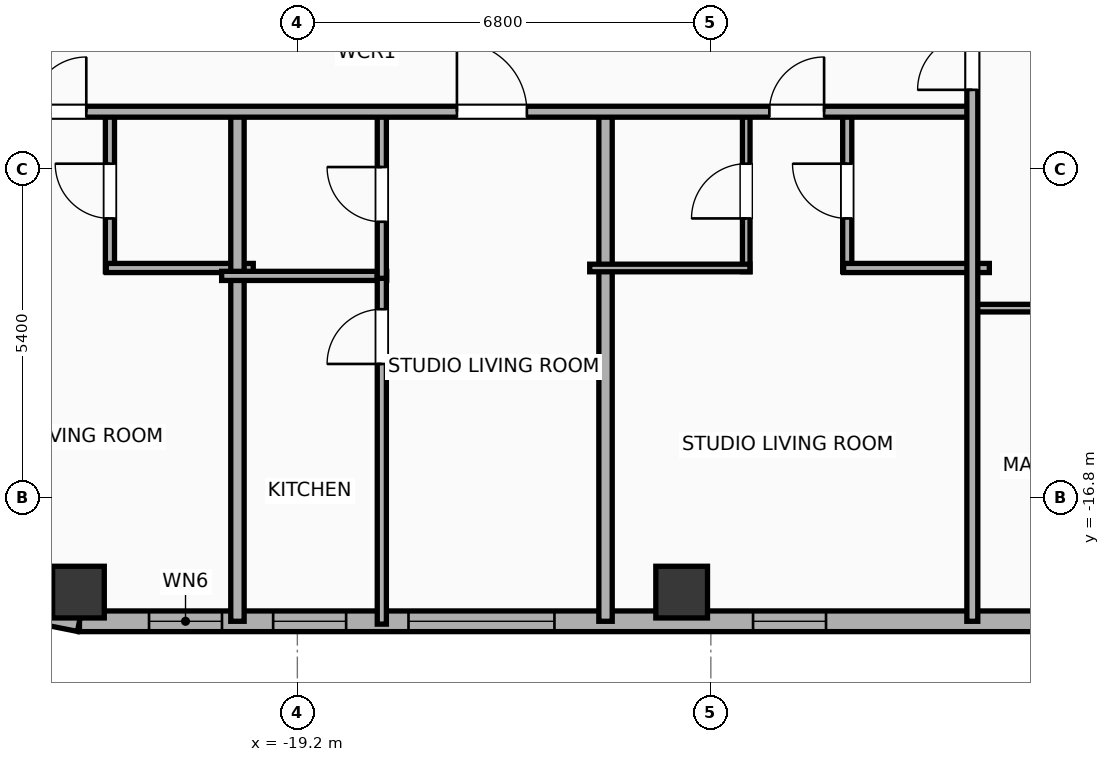
"""IFC4 building model, lengths in metres.
Left out: names, types, materials, properties, quantities, classifications, styles, units other than length and angle.
Written with IfcOpenShell. Run it as: python <this file> out.ifc"""

import sys

from ifc_helpers import new_model, si_unit, direction, frame, frame_2d, origin, origin_2d, place, context, subcontext, project, spatial, rectangle, hollow_rectangle, extrude, element, fill, save


model = new_model("IFC4")
c1 = context("Model", 3, precision=1e-05, world=origin(), true_north=direction((0.0, 1.0)))
c2 = subcontext(c1, "Body", "Model", "MODEL_VIEW")
j1 = project(units=[si_unit("LENGTHUNIT", "METRE"), si_unit("PLANEANGLEUNIT", "RADIAN")], contexts=[c1])
p1 = place(None, origin())
s1 = spatial("IfcSite", under=j1, at=p1, CompositionType="ELEMENT")
p2 = place(p1, origin())
s2 = spatial("IfcBuilding", under=s1, at=p2, CompositionType="ELEMENT")
p3 = place(p2, frame((0.0, 0.0, 227.5)))
s3 = spatial("IfcBuildingStorey", under=s2, at=p3, CompositionType="ELEMENT", Elevation=227.5)
for number, where, z_axis, x_axis in (
    (1, (-22.8, -18.35, 0.0), (0.0, 0.0, 1.0), (1.0, 0.0, 0.0)),
    (2, (-12.88, -18.35, 0.0), (0.0, 0.0, 1.0), (1.0, 0.0, 0.0)),
):
    element("IfcColumn", number, at=place(p3, frame(where, z_axis=z_axis, x_axis=x_axis)), inside=s3, PredefinedType="COLUMN", context=c2, shape_type="SweptSolid", body=[
        extrude(hollow_rectangle(XDim=0.85, YDim=0.85, WallThickness=0.028, at=origin_2d()), origin(), (0.0, 0.0, 1.0), 3.9),
    ])
p4 = place(p3, frame((26.783, -18.83, 0.0), z_axis=(0.0, 0.0, 1.0), x_axis=(-1.0, 0.0, 0.0)))
e3 = element("IfcWall", 3, at=p4, inside=s3, PredefinedType="ELEMENTEDWALL", context=c2, shape_type="SweptSolid", body=[
    extrude(rectangle(XDim=49.566, YDim=0.34, at=frame_2d((24.783, 0.0))), origin(), (0.0, 0.0, 1.0), 3.65),
])
p5 = place(p4, frame((23.583, 0.0, 0.75)))
e4 = element("IfcOpeningElement", 4, at=p5, cuts=e3, PredefinedType="OPENING", context=c2, shape_type="SweptSolid", body=[
    extrude(rectangle(XDim=2.4, YDim=2.1, at=frame_2d((1.2, 1.05))), frame((0.0, 0.18, 0.0), z_axis=(0.0, -1.0, 0.0), x_axis=(1.0, 0.0, 0.0)), (0.0, 0.0, 1.0), 0.36),
])
p6 = place(p4, frame((41.756, 0.0, 0.75)))
e5 = element("IfcOpeningElement", 5, at=p6, cuts=e3, PredefinedType="OPENING", context=c2, shape_type="SweptSolid", body=[
    extrude(rectangle(XDim=2.4, YDim=2.1, at=frame_2d((1.2, 1.05))), frame((0.0, 0.18, 0.0), z_axis=(0.0, -1.0, 0.0), x_axis=(1.0, 0.0, 0.0)), (0.0, 0.0, 1.0), 0.36),
])
p7 = place(p4, frame((47.222, 0.0, 0.75)))
e6 = element("IfcOpeningElement", 6, at=p7, cuts=e3, PredefinedType="OPENING", context=c2, shape_type="SweptSolid", body=[
    extrude(rectangle(XDim=1.2, YDim=2.05, at=frame_2d((0.6, 1.025))), frame((0.0, 0.18, 0.0), z_axis=(0.0, -1.0, 0.0), x_axis=(1.0, 0.0, 0.0)), (0.0, 0.0, 1.0), 0.36),
])
p8 = place(p4, frame((45.181, 0.0, 0.75)))
e7 = element("IfcOpeningElement", 7, at=p8, cuts=e3, PredefinedType="OPENING", context=c2, shape_type="SweptSolid", body=[
    extrude(rectangle(XDim=1.2, YDim=2.05, at=frame_2d((0.6, 1.025))), frame((0.0, 0.18, 0.0), z_axis=(0.0, -1.0, 0.0), x_axis=(1.0, 0.0, 0.0)), (0.0, 0.0, 1.0), 0.36),
])
p9 = place(p4, frame((37.289, 0.0, 0.75)))
e8 = element("IfcOpeningElement", 8, at=p9, cuts=e3, PredefinedType="OPENING", context=c2, shape_type="SweptSolid", body=[
    extrude(rectangle(XDim=1.2, YDim=2.05, at=frame_2d((0.6, 1.025))), frame((0.0, 0.18, 0.0), z_axis=(0.0, -1.0, 0.0), x_axis=(1.0, 0.0, 0.0)), (0.0, 0.0, 1.0), 0.36),
])
p10 = place(p4, frame((16.115, 0.0, 0.75)))
e9 = element("IfcOpeningElement", 9, at=p10, cuts=e3, PredefinedType="OPENING", context=c2, shape_type="SweptSolid", body=[
    extrude(rectangle(XDim=1.2, YDim=2.05, at=frame_2d((0.6, 1.025))), frame((0.0, 0.18, 0.0), z_axis=(0.0, -1.0, 0.0), x_axis=(1.0, 0.0, 0.0)), (0.0, 0.0, 1.0), 0.36),
])
p11 = place(p4, frame((12.422, 0.0, 0.75)))
e10 = element("IfcOpeningElement", 10, at=p11, cuts=e3, PredefinedType="OPENING", context=c2, shape_type="SweptSolid", body=[
    extrude(rectangle(XDim=1.2, YDim=2.05, at=frame_2d((0.6, 1.025))), frame((0.0, 0.18, 0.0), z_axis=(0.0, -1.0, 0.0), x_axis=(1.0, 0.0, 0.0)), (0.0, 0.0, 1.0), 0.36),
])
p12 = place(p4, frame((8.09, 0.0, 0.75)))
e11 = element("IfcOpeningElement", 11, at=p12, cuts=e3, PredefinedType="OPENING", context=c2, shape_type="SweptSolid", body=[
    extrude(rectangle(XDim=1.2, YDim=2.05, at=frame_2d((0.6, 1.025))), frame((0.0, 0.18, 0.0), z_axis=(0.0, -1.0, 0.0), x_axis=(1.0, 0.0, 0.0)), (0.0, 0.0, 1.0), 0.36),
])
p13 = place(p4, frame((4.637, 0.0, 0.75)))
e12 = element("IfcOpeningElement", 12, at=p13, cuts=e3, PredefinedType="OPENING", context=c2, shape_type="SweptSolid", body=[
    extrude(rectangle(XDim=1.2, YDim=2.05, at=frame_2d((0.6, 1.025))), frame((0.0, 0.18, 0.0), z_axis=(0.0, -1.0, 0.0), x_axis=(1.0, 0.0, 0.0)), (0.0, 0.0, 1.0), 0.36),
])
p14 = place(p4, frame((1.811, 0.0, 0.75)))
e13 = element("IfcOpeningElement", 13, at=p14, cuts=e3, PredefinedType="OPENING", context=c2, shape_type="SweptSolid", body=[
    extrude(rectangle(XDim=1.2, YDim=2.05, at=frame_2d((0.6, 1.025))), frame((0.0, 0.18, 0.0), z_axis=(0.0, -1.0, 0.0), x_axis=(1.0, 0.0, 0.0)), (0.0, 0.0, 1.0), 0.36),
])
p15 = place(p4, frame((32.253, 0.0, 0.75)))
e14 = element("IfcOpeningElement", 14, at=p15, cuts=e3, PredefinedType="OPENING", context=c2, shape_type="SweptSolid", body=[
    extrude(rectangle(XDim=1.2, YDim=2.05, at=frame_2d((0.6, 1.025))), frame((0.0, 0.18, 0.0), z_axis=(0.0, -1.0, 0.0), x_axis=(1.0, 0.0, 0.0)), (0.0, 0.0, 1.0), 0.36),
])
p16 = place(p4, frame((27.853, 0.0, 0.75)))
e15 = element("IfcOpeningElement", 15, at=p16, cuts=e3, PredefinedType="OPENING", context=c2, shape_type="SweptSolid", body=[
    extrude(rectangle(XDim=1.2, YDim=2.05, at=frame_2d((0.6, 1.025))), frame((0.0, 0.18, 0.0), z_axis=(0.0, -1.0, 0.0), x_axis=(1.0, 0.0, 0.0)), (0.0, 0.0, 1.0), 0.36),
])
p17 = place(p4, frame((20.473, 0.0, 0.75)))
e16 = element("IfcOpeningElement", 16, at=p17, cuts=e3, PredefinedType="OPENING", context=c2, shape_type="SweptSolid", body=[
    extrude(rectangle(XDim=1.2, YDim=2.05, at=frame_2d((0.6, 1.025))), frame((0.0, 0.18, 0.0), z_axis=(0.0, -1.0, 0.0), x_axis=(1.0, 0.0, 0.0)), (0.0, 0.0, 1.0), 0.36),
])
p18 = place(p3, frame((-22.783, -18.83, 0.0), z_axis=(0.0, 0.0, 1.0), x_axis=(-0.980788153188, 0.195075878998, 0.0)))
e17 = element("IfcWall", 17, at=p18, inside=s3, PredefinedType="ELEMENTEDWALL", context=c2, shape_type="SweptSolid", body=[
    extrude(rectangle(XDim=1.354, YDim=0.34, at=frame_2d((0.677, 0.0))), origin(), (0.0, 0.0, 1.0), 3.65),
])
p19 = place(p3, frame((-22.282, -13.08, 0.0), z_axis=(0.0, 0.0, 1.0), x_axis=(0.0, 1.0, 0.0)))
e18 = element("IfcWall", 18, at=p19, inside=s3, PredefinedType="PLUMBINGWALL", context=c2, shape_type="SweptSolid", body=[
    extrude(rectangle(XDim=2.65, YDim=0.15, at=frame_2d((1.325, 0.0))), origin(), (0.0, 0.0, 1.0), 3.65),
])
p20 = place(p19, frame((0.875, 0.0, 0.0)))
e19 = element("IfcOpeningElement", 19, at=p20, cuts=e18, PredefinedType="OPENING", context=c2, shape_type="SweptSolid", body=[
    extrude(rectangle(XDim=0.9, YDim=2.05, at=frame_2d((0.45, 1.025))), frame((0.0, 0.085, 0.0), z_axis=(0.0, -1.0, 0.0), x_axis=(1.0, 0.0, 0.0)), (0.0, 0.0, 1.0), 0.17),
])
p21 = place(p3, frame((-22.342, -13.02, 0.0), z_axis=(0.0, 0.0, 1.0), x_axis=(1.0, 0.0, 0.0)))
e20 = element("IfcWall", 20, at=p21, inside=s3, PredefinedType="PLUMBINGWALL", context=c2, shape_type="SweptSolid", body=[
    extrude(rectangle(XDim=2.417, YDim=0.15, at=frame_2d((1.208, 0.0))), origin(), (0.0, 0.0, 1.0), 3.65),
])
p22 = place(p3, frame((-20.185, -18.83, 0.0), z_axis=(0.0, 0.0, 1.0), x_axis=(0.0, 1.0, 0.0)))
e21 = element("IfcWall", 21, at=p22, inside=s3, PredefinedType="PARTITIONING", context=c2, shape_type="SweptSolid", body=[
    extrude(rectangle(XDim=8.46, YDim=0.22, at=frame_2d((4.23, 0.0))), origin(), (0.0, 0.0, 1.0), 3.09),
])
p23 = place(p3, frame((-20.445, -13.15, 0.0), z_axis=(0.0, 0.0, 1.0), x_axis=(1.0, 0.0, 0.0)))
e22 = element("IfcWall", 22, at=p23, inside=s3, PredefinedType="PLUMBINGWALL", context=c2, shape_type="SweptSolid", body=[
    extrude(rectangle(XDim=2.714, YDim=0.15, at=frame_2d((1.357, 0.0))), origin(), (0.0, 0.0, 1.0), 3.65),
])
p24 = place(p3, frame((-17.811, -18.877, 0.0), z_axis=(0.0, 0.0, 1.0), x_axis=(0.0, 1.0, 0.0)))
e23 = element("IfcWall", 23, at=p24, inside=s3, PredefinedType="PLUMBINGWALL", context=c2, shape_type="SweptSolid", body=[
    extrude(rectangle(XDim=5.767, YDim=0.15, at=frame_2d((2.883, 0.0))), origin(), (0.0, 0.0, 1.0), 3.65),
])
p25 = place(p24, frame((4.279, 0.0, 0.0)))
e24 = element("IfcOpeningElement", 24, at=p25, cuts=e23, PredefinedType="OPENING", context=c2, shape_type="SweptSolid", body=[
    extrude(rectangle(XDim=0.9, YDim=2.05, at=frame_2d((0.45, 1.025))), frame((0.0, 0.085, 0.0), z_axis=(0.0, -1.0, 0.0), x_axis=(1.0, 0.0, 0.0)), (0.0, 0.0, 1.0), 0.17),
])
p26 = place(p3, frame((-17.811, -13.19, 0.0), z_axis=(0.0, 0.0, 1.0), x_axis=(0.0, 1.0, 0.0)))
e25 = element("IfcWall", 25, at=p26, inside=s3, PredefinedType="PLUMBINGWALL", context=c2, shape_type="SweptSolid", body=[
    extrude(rectangle(XDim=2.76, YDim=0.15, at=frame_2d((1.38, 0.0))), origin(), (0.0, 0.0, 1.0), 3.65),
])
p27 = place(p26, frame((0.93, 0.0, 0.0)))
e26 = element("IfcOpeningElement", 26, at=p27, cuts=e25, PredefinedType="OPENING", context=c2, shape_type="SweptSolid", body=[
    extrude(rectangle(XDim=0.9, YDim=2.05, at=frame_2d((0.45, 1.025))), frame((0.0, 0.085, 0.0), z_axis=(0.0, -1.0, 0.0), x_axis=(1.0, 0.0, 0.0)), (0.0, 0.0, 1.0), 0.17),
])
p28 = place(p3, frame((-14.132, -18.83, 0.0), z_axis=(0.0, 0.0, 1.0), x_axis=(0.0, 1.0, 0.0)))
e27 = element("IfcWall", 27, at=p28, inside=s3, PredefinedType="PARTITIONING", context=c2, shape_type="SweptSolid", body=[
    extrude(rectangle(XDim=8.46, YDim=0.22, at=frame_2d((4.23, 0.0))), origin(), (0.0, 0.0, 1.0), 3.65),
])
p29 = place(p3, frame((-11.818, -13.08, 0.0), z_axis=(0.0, 0.0, 1.0), x_axis=(0.0, 1.0, 0.0)))
e28 = element("IfcWall", 28, at=p29, inside=s3, PredefinedType="PARTITIONING", context=c2, shape_type="SweptSolid", body=[
    extrude(rectangle(XDim=2.65, YDim=0.125, at=frame_2d((1.325, 0.0))), origin(), (0.0, 0.0, 1.0), 3.65),
])
p30 = place(p29, frame((0.875, 0.0, 0.0)))
e29 = element("IfcOpeningElement", 29, at=p30, cuts=e28, PredefinedType="OPENING", context=c2, shape_type="SweptSolid", body=[
    extrude(rectangle(XDim=0.9, YDim=2.05, at=frame_2d((0.45, 1.025))), frame((0.0, 0.073, 0.0), z_axis=(0.0, -1.0, 0.0), x_axis=(1.0, 0.0, 0.0)), (0.0, 0.0, 1.0), 0.145),
])
p31 = place(p3, frame((-10.157, -13.08, 0.0), z_axis=(0.0, 0.0, 1.0), x_axis=(0.0, 1.0, 0.0)))
e30 = element("IfcWall", 30, at=p31, inside=s3, PredefinedType="PLUMBINGWALL", context=c2, shape_type="SweptSolid", body=[
    extrude(rectangle(XDim=2.65, YDim=0.15, at=frame_2d((1.325, 0.0))), origin(), (0.0, 0.0, 1.0), 3.65),
])
p32 = place(p31, frame((0.875, 0.0, 0.0)))
e31 = element("IfcOpeningElement", 31, at=p32, cuts=e30, PredefinedType="OPENING", context=c2, shape_type="SweptSolid", body=[
    extrude(rectangle(XDim=0.9, YDim=2.05, at=frame_2d((0.45, 1.025))), frame((0.0, 0.085, 0.0), z_axis=(0.0, -1.0, 0.0), x_axis=(1.0, 0.0, 0.0)), (0.0, 0.0, 1.0), 0.17),
])
p33 = place(p3, frame((-14.392, -13.02, 0.0), z_axis=(0.0, 0.0, 1.0), x_axis=(1.0, 0.0, 0.0)))
e32 = element("IfcWall", 32, at=p33, inside=s3, PredefinedType="PARTITIONING", context=c2, shape_type="SweptSolid", body=[
    extrude(rectangle(XDim=2.634, YDim=0.125, at=frame_2d((1.317, 0.0))), origin(), (0.0, 0.0, 1.0), 3.65),
])
p34 = place(p3, frame((-10.217, -13.02, 0.0), z_axis=(0.0, 0.0, 1.0), x_axis=(1.0, 0.0, 0.0)))
e33 = element("IfcWall", 33, at=p34, inside=s3, PredefinedType="PLUMBINGWALL", context=c2, shape_type="SweptSolid", body=[
    extrude(rectangle(XDim=2.397, YDim=0.15, at=frame_2d((1.198, 0.0))), origin(), (0.0, 0.0, 1.0), 3.65),
])
p35 = place(p3, frame((-26.23, -10.45, 0.0), z_axis=(0.0, 0.0, 1.0), x_axis=(1.0, 0.0, 0.0)))
e34 = element("IfcWall", 34, at=p35, inside=s3, PredefinedType="PARTITIONING", context=c2, shape_type="SweptSolid", body=[
    extrude(rectangle(XDim=18.15, YDim=0.18, at=frame_2d((9.075, 0.0))), origin(), (0.0, 0.0, 1.0), 3.65),
])
p36 = place(p35, frame((2.659, 0.0, 0.0)))
e35 = element("IfcOpeningElement", 35, at=p36, cuts=e34, PredefinedType="OPENING", context=c2, shape_type="SweptSolid", body=[
    extrude(rectangle(XDim=0.9, YDim=2.05, at=frame_2d((0.45, 1.025))), frame((0.0, 0.1, 0.0), z_axis=(0.0, -1.0, 0.0), x_axis=(1.0, 0.0, 0.0)), (0.0, 0.0, 1.0), 0.2),
])
p37 = place(p35, frame((9.654, 0.0, 0.0)))
e36 = element("IfcOpeningElement", 36, at=p37, cuts=e34, PredefinedType="OPENING", context=c2, shape_type="SweptSolid", body=[
    extrude(rectangle(XDim=1.15, YDim=2.05, at=frame_2d((0.575, 1.025))), frame((0.0, 0.1, 0.0), z_axis=(0.0, -1.0, 0.0), x_axis=(1.0, 0.0, 0.0)), (0.0, 0.0, 1.0), 0.2),
])
p38 = place(p35, frame((14.792, 0.0, 0.0)))
e37 = element("IfcOpeningElement", 37, at=p38, cuts=e34, PredefinedType="OPENING", context=c2, shape_type="SweptSolid", body=[
    extrude(rectangle(XDim=0.9, YDim=2.05, at=frame_2d((0.45, 1.025))), frame((0.0, 0.1, 0.0), z_axis=(0.0, -1.0, 0.0), x_axis=(1.0, 0.0, 0.0)), (0.0, 0.0, 1.0), 0.2),
])
p39 = place(p3, frame((-8.08, -13.68, 0.0), z_axis=(0.0, 0.0, 1.0), x_axis=(1.0, 0.0, 0.0)))
e38 = element("IfcWall", 38, at=p39, inside=s3, PredefinedType="PARTITIONING", context=c2, shape_type="SweptSolid", body=[
    extrude(rectangle(XDim=8.06, YDim=0.125, at=frame_2d((4.03, 0.0))), origin(), (0.0, 0.0, 1.0), 3.65),
])
p40 = place(p39, frame((1.323, 0.0, 0.0)))
e39 = element("IfcOpeningElement", 39, at=p40, cuts=e38, PredefinedType="OPENING", context=c2, shape_type="SweptSolid", body=[
    extrude(rectangle(XDim=0.9, YDim=2.05, at=frame_2d((0.45, 1.025))), frame((0.0, 0.073, 0.0), z_axis=(0.0, -1.0, 0.0), x_axis=(1.0, 0.0, 0.0)), (0.0, 0.0, 1.0), 0.145),
])
p41 = place(p39, frame((4.547, 0.0, 0.0)))
e40 = element("IfcOpeningElement", 40, at=p41, cuts=e38, PredefinedType="OPENING", context=c2, shape_type="SweptSolid", body=[
    extrude(rectangle(XDim=0.9, YDim=2.05, at=frame_2d((0.45, 1.025))), frame((0.0, 0.073, 0.0), z_axis=(0.0, -1.0, 0.0), x_axis=(1.0, 0.0, 0.0)), (0.0, 0.0, 1.0), 0.145),
])
p42 = place(p3, frame((-8.1, -18.83, 0.0), z_axis=(0.0, 0.0, 1.0), x_axis=(0.0, 1.0, 0.0)))
e41 = element("IfcWall", 41, at=p42, inside=s3, PredefinedType="PARTITIONING", context=c2, shape_type="SweptSolid", body=[
    extrude(rectangle(XDim=9.99, YDim=0.18, at=frame_2d((4.995, 0.0))), origin(), (0.0, 0.0, 1.0), 3.65),
])
p43 = place(p42, frame((8.74, 0.0, 0.0)))
e42 = element("IfcOpeningElement", 42, at=p43, cuts=e41, PredefinedType="OPENING", context=c2, shape_type="SweptSolid", body=[
    extrude(rectangle(XDim=0.9, YDim=2.05, at=frame_2d((0.45, 1.025))), frame((0.0, 0.1, 0.0), z_axis=(0.0, -1.0, 0.0), x_axis=(1.0, 0.0, 0.0)), (0.0, 0.0, 1.0), 0.2),
])
p44 = place(p6, origin())
e43 = element("IfcWindow", 43, at=p44, inside=s3, PartitioningType="SINGLE_PANEL", PredefinedType="WINDOW", context=c2, shape_type="SweptSolid", body=[
    extrude(rectangle(XDim=2.4, YDim=2.1, at=frame_2d((1.2, 1.05))), frame((0.0, 0.03, 0.0), z_axis=(0.0, -1.0, 0.0), x_axis=(1.0, 0.0, 0.0)), (0.0, 0.0, 1.0), 0.06),
])
fill(e5, e43)
p45 = place(p7, origin())
e44 = element("IfcWindow", 44, at=p45, inside=s3, PartitioningType="SINGLE_PANEL", PredefinedType="WINDOW", context=c2, shape_type="SweptSolid", body=[
    extrude(rectangle(XDim=1.2, YDim=2.05, at=frame_2d((0.6, 1.025))), frame((0.0, 0.03, 0.0), z_axis=(0.0, -1.0, 0.0), x_axis=(1.0, 0.0, 0.0)), (0.0, 0.0, 1.0), 0.06),
])
fill(e6, e44)
p46 = place(p8, origin())
e45 = element("IfcWindow", 45, at=p46, inside=s3, PartitioningType="SINGLE_PANEL", PredefinedType="WINDOW", context=c2, shape_type="SweptSolid", body=[
    extrude(rectangle(XDim=1.2, YDim=2.05, at=frame_2d((0.6, 1.025))), frame((0.0, 0.03, 0.0), z_axis=(0.0, -1.0, 0.0), x_axis=(1.0, 0.0, 0.0)), (0.0, 0.0, 1.0), 0.06),
])
fill(e7, e45)
p47 = place(p9, origin())
e46 = element("IfcWindow", 46, at=p47, inside=s3, PartitioningType="SINGLE_PANEL", PredefinedType="WINDOW", context=c2, shape_type="SweptSolid", body=[
    extrude(rectangle(XDim=1.2, YDim=2.05, at=frame_2d((0.6, 1.025))), frame((0.0, 0.03, 0.0), z_axis=(0.0, -1.0, 0.0), x_axis=(1.0, 0.0, 0.0)), (0.0, 0.0, 1.0), 0.06),
])
fill(e8, e46)
p48 = place(p20, origin())
e47 = element("IfcDoor", 47, at=p48, inside=s3, OperationType="SINGLE_SWING_RIGHT", PredefinedType="DOOR", context=c2, shape_type="SweptSolid", body=[
    extrude(rectangle(XDim=0.9, YDim=2.05, at=frame_2d((0.45, 1.025))), frame((0.0, 0.025, 0.0), z_axis=(0.0, -1.0, 0.0), x_axis=(1.0, 0.0, 0.0)), (0.0, 0.0, 1.0), 0.05),
])
fill(e19, e47)
p49 = place(p25, origin())
e48 = element("IfcDoor", 48, at=p49, inside=s3, OperationType="SINGLE_SWING_LEFT", PredefinedType="DOOR", context=c2, shape_type="SweptSolid", body=[
    extrude(rectangle(XDim=0.9, YDim=2.05, at=frame_2d((0.45, 1.025))), frame((0.0, 0.025, 0.0), z_axis=(0.0, -1.0, 0.0), x_axis=(1.0, 0.0, 0.0)), (0.0, 0.0, 1.0), 0.05),
])
fill(e24, e48)
p50 = place(p27, origin())
e49 = element("IfcDoor", 49, at=p50, inside=s3, OperationType="SINGLE_SWING_RIGHT", PredefinedType="DOOR", context=c2, shape_type="SweptSolid", body=[
    extrude(rectangle(XDim=0.9, YDim=2.05, at=frame_2d((0.45, 1.025))), frame((0.0, 0.025, 0.0), z_axis=(0.0, -1.0, 0.0), x_axis=(1.0, 0.0, 0.0)), (0.0, 0.0, 1.0), 0.05),
])
fill(e26, e49)
p51 = place(p30, origin())
e50 = element("IfcDoor", 50, at=p51, inside=s3, OperationType="SINGLE_SWING_LEFT", PredefinedType="DOOR", context=c2, shape_type="SweptSolid", body=[
    extrude(rectangle(XDim=0.9, YDim=2.05, at=frame_2d((0.45, 1.025))), frame((0.0, 0.025, 0.0), z_axis=(0.0, -1.0, 0.0), x_axis=(1.0, 0.0, 0.0)), (0.0, 0.0, 1.0), 0.05),
])
fill(e29, e50)
p52 = place(p32, origin())
e51 = element("IfcDoor", 51, at=p52, inside=s3, OperationType="SINGLE_SWING_RIGHT", PredefinedType="DOOR", context=c2, shape_type="SweptSolid", body=[
    extrude(rectangle(XDim=0.9, YDim=2.05, at=frame_2d((0.45, 1.025))), frame((0.0, 0.025, 0.0), z_axis=(0.0, -1.0, 0.0), x_axis=(1.0, 0.0, 0.0)), (0.0, 0.0, 1.0), 0.05),
])
fill(e31, e51)
p53 = place(p36, origin())
e52 = element("IfcDoor", 52, at=p53, inside=s3, OperationType="SINGLE_SWING_RIGHT", PredefinedType="DOOR", context=c2, shape_type="SweptSolid", body=[
    extrude(rectangle(XDim=0.9, YDim=2.05, at=frame_2d((0.45, 1.025))), frame((0.0, 0.025, 0.0), z_axis=(0.0, -1.0, 0.0), x_axis=(1.0, 0.0, 0.0)), (0.0, 0.0, 1.0), 0.05),
])
fill(e35, e52)
p54 = place(p37, origin())
e53 = element("IfcDoor", 53, at=p54, inside=s3, OperationType="SINGLE_SWING_LEFT", PredefinedType="DOOR", context=c2, shape_type="SweptSolid", body=[
    extrude(rectangle(XDim=1.15, YDim=2.05, at=frame_2d((0.575, 1.025))), frame((0.0, 0.025, 0.0), z_axis=(0.0, -1.0, 0.0), x_axis=(1.0, 0.0, 0.0)), (0.0, 0.0, 1.0), 0.05),
])
fill(e36, e53)
p55 = place(p38, origin())
e54 = element("IfcDoor", 54, at=p55, inside=s3, OperationType="SINGLE_SWING_RIGHT", PredefinedType="DOOR", context=c2, shape_type="SweptSolid", body=[
    extrude(rectangle(XDim=0.9, YDim=2.05, at=frame_2d((0.45, 1.025))), frame((0.0, 0.025, 0.0), z_axis=(0.0, -1.0, 0.0), x_axis=(1.0, 0.0, 0.0)), (0.0, 0.0, 1.0), 0.05),
])
fill(e37, e54)
p56 = place(p43, origin())
e55 = element("IfcDoor", 55, at=p56, inside=s3, OperationType="SINGLE_SWING_LEFT", PredefinedType="DOOR", context=c2, shape_type="SweptSolid", body=[
    extrude(rectangle(XDim=0.9, YDim=2.05, at=frame_2d((0.45, 1.025))), frame((0.0, 0.025, 0.0), z_axis=(0.0, -1.0, 0.0), x_axis=(1.0, 0.0, 0.0)), (0.0, 0.0, 1.0), 0.05),
])
fill(e42, e55)
save(model, sys.argv[1])
